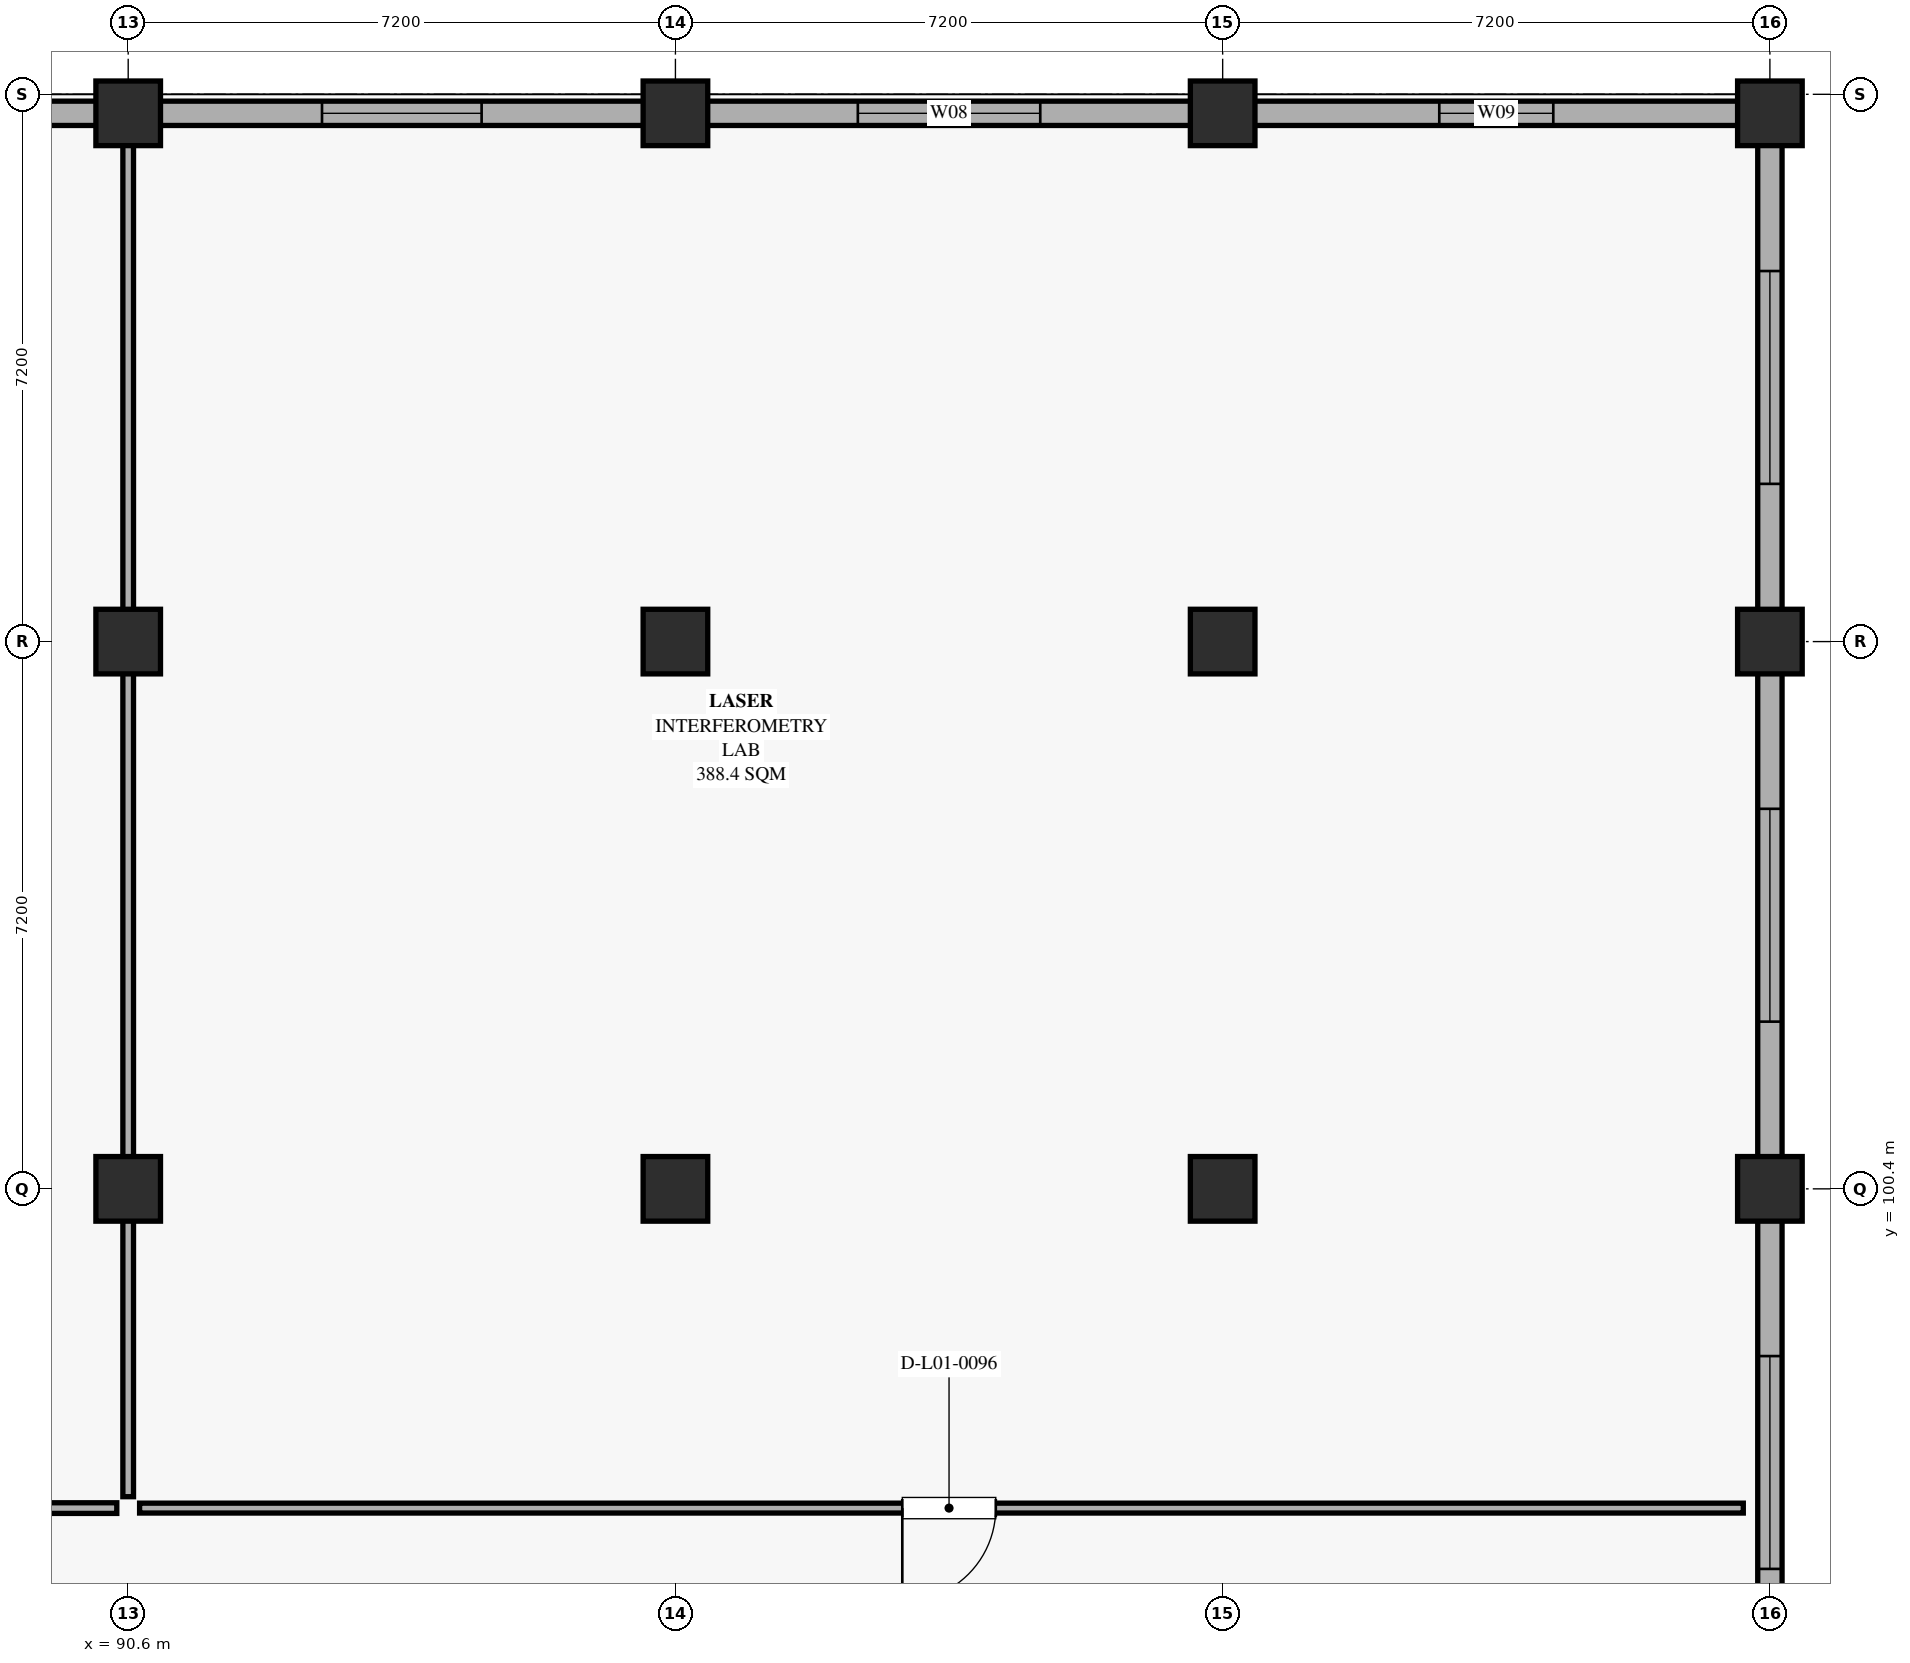
"""IFC4 building model, lengths in metres.
Left out: names, types, materials, properties, quantities, classifications, styles, units other than length and angle.
Written with IfcOpenShell. Run it as: python <this file> out.ifc"""

import sys

from ifc_helpers import new_model, si_unit, direction, frame, frame_2d, origin, origin_2d, place, context, subcontext, project, spatial, rectangle, extrude, element, fill, save


model = new_model("IFC4")
c1 = context("Model", 3, precision=1e-05, world=origin(), true_north=direction((0.0, 1.0)))
c2 = subcontext(c1, "Body", "Model", "MODEL_VIEW")
j1 = project(units=[si_unit("LENGTHUNIT", "METRE"), si_unit("PLANEANGLEUNIT", "RADIAN")], contexts=[c1])
p1 = place(None, origin())
s1 = spatial("IfcSite", under=j1, at=p1, CompositionType="ELEMENT")
p2 = place(p1, origin())
s2 = spatial("IfcBuilding", under=s1, at=p2, CompositionType="ELEMENT")
p3 = place(p2, frame((0.0, 0.0, 5.4)))
s3 = spatial("IfcBuildingStorey", under=s2, at=p3, CompositionType="ELEMENT", Elevation=5.4)
for number, where, z_axis, x_axis in (
    (1, (90.6, 100.4, 0.0), (0.0, 0.0, 1.0), (1.0, 0.0, 0.0)),
    (2, (97.8, 100.4, 0.0), (0.0, 0.0, 1.0), (1.0, 0.0, 0.0)),
    (3, (105.0, 100.4, 0.0), (0.0, 0.0, 1.0), (1.0, 0.0, 0.0)),
    (4, (112.2, 100.4, 0.0), (0.0, 0.0, 1.0), (1.0, 0.0, 0.0)),
    (5, (90.6, 107.6, 0.0), (0.0, 0.0, 1.0), (1.0, 0.0, 0.0)),
    (6, (97.8, 107.6, 0.0), (0.0, 0.0, 1.0), (1.0, 0.0, 0.0)),
    (7, (105.0, 107.6, 0.0), (0.0, 0.0, 1.0), (1.0, 0.0, 0.0)),
    (8, (112.2, 107.6, 0.0), (0.0, 0.0, 1.0), (1.0, 0.0, 0.0)),
    (9, (90.6, 114.55, 0.0), (0.0, 0.0, 1.0), (1.0, 0.0, 0.0)),
    (10, (97.8, 114.55, 0.0), (0.0, 0.0, 1.0), (1.0, 0.0, 0.0)),
    (11, (105.0, 114.55, 0.0), (0.0, 0.0, 1.0), (1.0, 0.0, 0.0)),
    (12, (112.2, 114.55, 0.0), (0.0, 0.0, 1.0), (1.0, 0.0, 0.0)),
):
    element("IfcColumn", number, at=place(p3, frame(where, z_axis=z_axis, x_axis=x_axis)), inside=s3, PredefinedType="COLUMN", context=c2, shape_type="SweptSolid", body=[
        extrude(rectangle(XDim=0.85, YDim=0.85, at=origin_2d()), origin(), (0.0, 0.0, 1.0), 5.04),
    ])
p4 = place(p3, frame((112.2, 99.99, 0.0), z_axis=(0.0, 0.0, 1.0), x_axis=(0.0, -1.0, 0.0)))
e13 = element("IfcWall", 13, at=p4, inside=s3, PredefinedType="SOLIDWALL", context=c2, shape_type="SweptSolid", body=[
    extrude(rectangle(XDim=6.38, YDim=0.32, at=frame_2d((3.19, 0.0))), origin(), (0.0, 0.0, 1.0), 3.54),
])
p5 = place(p4, frame((1.79, 0.0, 0.9)))
e14 = element("IfcOpeningElement", 14, at=p5, cuts=e13, PredefinedType="OPENING", context=c2, shape_type="SweptSolid", body=[
    extrude(rectangle(XDim=2.8, YDim=2.2, at=frame_2d((1.4, 1.1))), frame((0.0, 0.17, 0.0), z_axis=(0.0, -1.0, 0.0), x_axis=(1.0, 0.0, 0.0)), (0.0, 0.0, 1.0), 0.34),
])
p6 = place(p3, frame((112.2, 107.19, 0.0), z_axis=(0.0, 0.0, 1.0), x_axis=(0.0, -1.0, 0.0)))
e15 = element("IfcWall", 15, at=p6, inside=s3, PredefinedType="SOLIDWALL", context=c2, shape_type="SweptSolid", body=[
    extrude(rectangle(XDim=6.38, YDim=0.32, at=frame_2d((3.19, 0.0))), origin(), (0.0, 0.0, 1.0), 3.54),
])
p7 = place(p6, frame((1.79, 0.0, 0.9)))
e16 = element("IfcOpeningElement", 16, at=p7, cuts=e15, PredefinedType="OPENING", context=c2, shape_type="SweptSolid", body=[
    extrude(rectangle(XDim=2.8, YDim=2.2, at=frame_2d((1.4, 1.1))), frame((0.0, 0.17, 0.0), z_axis=(0.0, -1.0, 0.0), x_axis=(1.0, 0.0, 0.0)), (0.0, 0.0, 1.0), 0.34),
])
p8 = place(p3, frame((112.2, 114.14, 0.0), z_axis=(0.0, 0.0, 1.0), x_axis=(0.0, -1.0, 0.0)))
e17 = element("IfcWall", 17, at=p8, inside=s3, PredefinedType="SOLIDWALL", context=c2, shape_type="SweptSolid", body=[
    extrude(rectangle(XDim=6.13, YDim=0.32, at=frame_2d((3.065, 0.0))), origin(), (0.0, 0.0, 1.0), 3.54),
])
p9 = place(p8, frame((1.665, 0.0, 0.9)))
e18 = element("IfcOpeningElement", 18, at=p9, cuts=e17, PredefinedType="OPENING", context=c2, shape_type="SweptSolid", body=[
    extrude(rectangle(XDim=2.8, YDim=2.2, at=frame_2d((1.4, 1.1))), frame((0.0, 0.17, 0.0), z_axis=(0.0, -1.0, 0.0), x_axis=(1.0, 0.0, 0.0)), (0.0, 0.0, 1.0), 0.34),
])
p10 = place(p3, frame((83.81, 114.55, 0.0), z_axis=(0.0, 0.0, 1.0), x_axis=(1.0, 0.0, 0.0)))
e19 = element("IfcWall", 19, at=p10, inside=s3, PredefinedType="SOLIDWALL", context=c2, shape_type="SweptSolid", body=[
    extrude(rectangle(XDim=6.38, YDim=0.32, at=frame_2d((3.19, 0.0))), origin(), (0.0, 0.0, 1.0), 3.54),
])
p11 = place(p10, frame((2.29, 0.0, 0.9)))
e20 = element("IfcOpeningElement", 20, at=p11, cuts=e19, PredefinedType="OPENING", context=c2, shape_type="SweptSolid", body=[
    extrude(rectangle(XDim=1.8, YDim=2.1, at=frame_2d((0.9, 1.05))), frame((0.0, 0.17, 0.0), z_axis=(0.0, -1.0, 0.0), x_axis=(1.0, 0.0, 0.0)), (0.0, 0.0, 1.0), 0.34),
])
p12 = place(p3, frame((91.01, 114.55, 0.0), z_axis=(0.0, 0.0, 1.0), x_axis=(1.0, 0.0, 0.0)))
e21 = element("IfcWall", 21, at=p12, inside=s3, PredefinedType="SOLIDWALL", context=c2, shape_type="SweptSolid", body=[
    extrude(rectangle(XDim=6.38, YDim=0.32, at=frame_2d((3.19, 0.0))), origin(), (0.0, 0.0, 1.0), 3.54),
])
p13 = place(p12, frame((2.14, 0.0, 0.9)))
e22 = element("IfcOpeningElement", 22, at=p13, cuts=e21, PredefinedType="OPENING", context=c2, shape_type="SweptSolid", body=[
    extrude(rectangle(XDim=2.1, YDim=2.1, at=frame_2d((1.05, 1.05))), frame((0.0, 0.17, 0.0), z_axis=(0.0, -1.0, 0.0), x_axis=(1.0, 0.0, 0.0)), (0.0, 0.0, 1.0), 0.34),
])
p14 = place(p3, frame((98.21, 114.55, 0.0), z_axis=(0.0, 0.0, 1.0), x_axis=(1.0, 0.0, 0.0)))
e23 = element("IfcWall", 23, at=p14, inside=s3, PredefinedType="SOLIDWALL", context=c2, shape_type="SweptSolid", body=[
    extrude(rectangle(XDim=6.38, YDim=0.32, at=frame_2d((3.19, 0.0))), origin(), (0.0, 0.0, 1.0), 3.54),
])
p15 = place(p14, frame((1.99, 0.0, 0.9)))
e24 = element("IfcOpeningElement", 24, at=p15, cuts=e23, PredefinedType="OPENING", context=c2, shape_type="SweptSolid", body=[
    extrude(rectangle(XDim=2.4, YDim=2.1, at=frame_2d((1.2, 1.05))), frame((0.0, 0.17, 0.0), z_axis=(0.0, -1.0, 0.0), x_axis=(1.0, 0.0, 0.0)), (0.0, 0.0, 1.0), 0.34),
])
p16 = place(p3, frame((105.41, 114.55, 0.0), z_axis=(0.0, 0.0, 1.0), x_axis=(1.0, 0.0, 0.0)))
e25 = element("IfcWall", 25, at=p16, inside=s3, PredefinedType="SOLIDWALL", context=c2, shape_type="SweptSolid", body=[
    extrude(rectangle(XDim=6.38, YDim=0.32, at=frame_2d((3.19, 0.0))), origin(), (0.0, 0.0, 1.0), 3.54),
])
p17 = place(p16, frame((2.44, 0.0, 0.9)))
e26 = element("IfcOpeningElement", 26, at=p17, cuts=e25, PredefinedType="OPENING", context=c2, shape_type="SweptSolid", body=[
    extrude(rectangle(XDim=1.5, YDim=2.1, at=frame_2d((0.75, 1.05))), frame((0.0, 0.17, 0.0), z_axis=(0.0, -1.0, 0.0), x_axis=(1.0, 0.0, 0.0)), (0.0, 0.0, 1.0), 0.34),
])
p18 = place(p3, frame((90.45, 96.2, 0.0), z_axis=(0.0, 0.0, 1.0), x_axis=(-1.0, 0.0, 0.0)))
e27 = element("IfcWall", 27, at=p18, inside=s3, PredefinedType="PARTITIONING", context=c2, shape_type="SweptSolid", body=[
    extrude(rectangle(XDim=28.3, YDim=0.14, at=frame_2d((14.15, 0.0))), origin(), (0.0, 0.0, 1.0), 3.52),
])
p19 = place(p18, frame((17.255, 0.0, 0.0)))
e28 = element("IfcOpeningElement", 28, at=p19, cuts=e27, PredefinedType="OPENING", context=c2, shape_type="SweptSolid", body=[
    extrude(rectangle(XDim=1.19, YDim=2.22, at=frame_2d((0.595, 1.11))), frame((0.0, 0.08, 0.0), z_axis=(0.0, -1.0, 0.0), x_axis=(1.0, 0.0, 0.0)), (0.0, 0.0, 1.0), 0.16),
])
p20 = place(p3, frame((90.6, 114.2, 0.0), z_axis=(0.0, 0.0, 1.0), x_axis=(0.0, -1.0, 0.0)))
e29 = element("IfcWall", 29, at=p20, inside=s3, PredefinedType="PARTITIONING", context=c2, shape_type="SweptSolid", body=[
    extrude(rectangle(XDim=17.85, YDim=0.14, at=frame_2d((8.925, 0.0))), origin(), (0.0, 0.0, 1.0), 3.52),
])
p21 = place(p3, frame((111.85, 96.2, 0.0), z_axis=(0.0, 0.0, 1.0), x_axis=(-1.0, 0.0, 0.0)))
e30 = element("IfcWall", 30, at=p21, inside=s3, PredefinedType="PARTITIONING", context=c2, shape_type="SweptSolid", body=[
    extrude(rectangle(XDim=21.1, YDim=0.13, at=frame_2d((10.55, 0.0))), origin(), (0.0, 0.0, 1.0), 3.52),
])
p22 = place(p21, frame((9.835, 0.0, 0.0)))
e31 = element("IfcOpeningElement", 31, at=p22, cuts=e30, PredefinedType="OPENING", context=c2, shape_type="SweptSolid", body=[
    extrude(rectangle(XDim=1.23, YDim=2.05, at=frame_2d((0.615, 1.025))), frame((0.0, 0.075, 0.0), z_axis=(0.0, -1.0, 0.0), x_axis=(1.0, 0.0, 0.0)), (0.0, 0.0, 1.0), 0.15),
])
p23 = place(p5, origin())
e32 = element("IfcWindow", 32, at=p23, inside=s3, PartitioningType="DOUBLE_PANEL_VERTICAL", PredefinedType="WINDOW", context=c2, shape_type="SweptSolid", body=[
    extrude(rectangle(XDim=2.8, YDim=2.2, at=frame_2d((1.4, 1.1))), frame((0.0, 0.03, 0.0), z_axis=(0.0, -1.0, 0.0), x_axis=(1.0, 0.0, 0.0)), (0.0, 0.0, 1.0), 0.06),
])
fill(e14, e32)
p24 = place(p7, origin())
e33 = element("IfcWindow", 33, at=p24, inside=s3, PartitioningType="DOUBLE_PANEL_VERTICAL", PredefinedType="WINDOW", context=c2, shape_type="SweptSolid", body=[
    extrude(rectangle(XDim=2.8, YDim=2.2, at=frame_2d((1.4, 1.1))), frame((0.0, 0.03, 0.0), z_axis=(0.0, -1.0, 0.0), x_axis=(1.0, 0.0, 0.0)), (0.0, 0.0, 1.0), 0.06),
])
fill(e16, e33)
p25 = place(p9, origin())
e34 = element("IfcWindow", 34, at=p25, inside=s3, PartitioningType="DOUBLE_PANEL_VERTICAL", PredefinedType="WINDOW", context=c2, shape_type="SweptSolid", body=[
    extrude(rectangle(XDim=2.8, YDim=2.2, at=frame_2d((1.4, 1.1))), frame((0.0, 0.03, 0.0), z_axis=(0.0, -1.0, 0.0), x_axis=(1.0, 0.0, 0.0)), (0.0, 0.0, 1.0), 0.06),
])
fill(e18, e34)
p26 = place(p13, origin())
e35 = element("IfcWindow", 35, at=p26, inside=s3, PartitioningType="DOUBLE_PANEL_VERTICAL", PredefinedType="WINDOW", context=c2, shape_type="SweptSolid", body=[
    extrude(rectangle(XDim=2.1, YDim=2.1, at=frame_2d((1.05, 1.05))), frame((0.0, 0.03, 0.0), z_axis=(0.0, -1.0, 0.0), x_axis=(1.0, 0.0, 0.0)), (0.0, 0.0, 1.0), 0.06),
])
fill(e22, e35)
p27 = place(p15, origin())
e36 = element("IfcWindow", 36, at=p27, inside=s3, PartitioningType="DOUBLE_PANEL_VERTICAL", PredefinedType="WINDOW", context=c2, shape_type="SweptSolid", body=[
    extrude(rectangle(XDim=2.4, YDim=2.1, at=frame_2d((1.2, 1.05))), frame((0.0, 0.03, 0.0), z_axis=(0.0, -1.0, 0.0), x_axis=(1.0, 0.0, 0.0)), (0.0, 0.0, 1.0), 0.06),
])
fill(e24, e36)
p28 = place(p17, origin())
e37 = element("IfcWindow", 37, at=p28, inside=s3, PartitioningType="SINGLE_PANEL", PredefinedType="WINDOW", context=c2, shape_type="SweptSolid", body=[
    extrude(rectangle(XDim=1.5, YDim=2.1, at=frame_2d((0.75, 1.05))), frame((0.0, 0.03, 0.0), z_axis=(0.0, -1.0, 0.0), x_axis=(1.0, 0.0, 0.0)), (0.0, 0.0, 1.0), 0.06),
])
fill(e26, e37)
p29 = place(p22, origin())
e38 = element("IfcDoor", 38, at=p29, inside=s3, OperationType="SINGLE_SWING_RIGHT", PredefinedType="DOOR", context=c2, shape_type="SweptSolid", body=[
    extrude(rectangle(XDim=1.23, YDim=2.05, at=frame_2d((0.615, 1.025))), frame((0.0, 0.025, 0.0), z_axis=(0.0, -1.0, 0.0), x_axis=(1.0, 0.0, 0.0)), (0.0, 0.0, 1.0), 0.05),
])
fill(e31, e38)
save(model, sys.argv[1])
